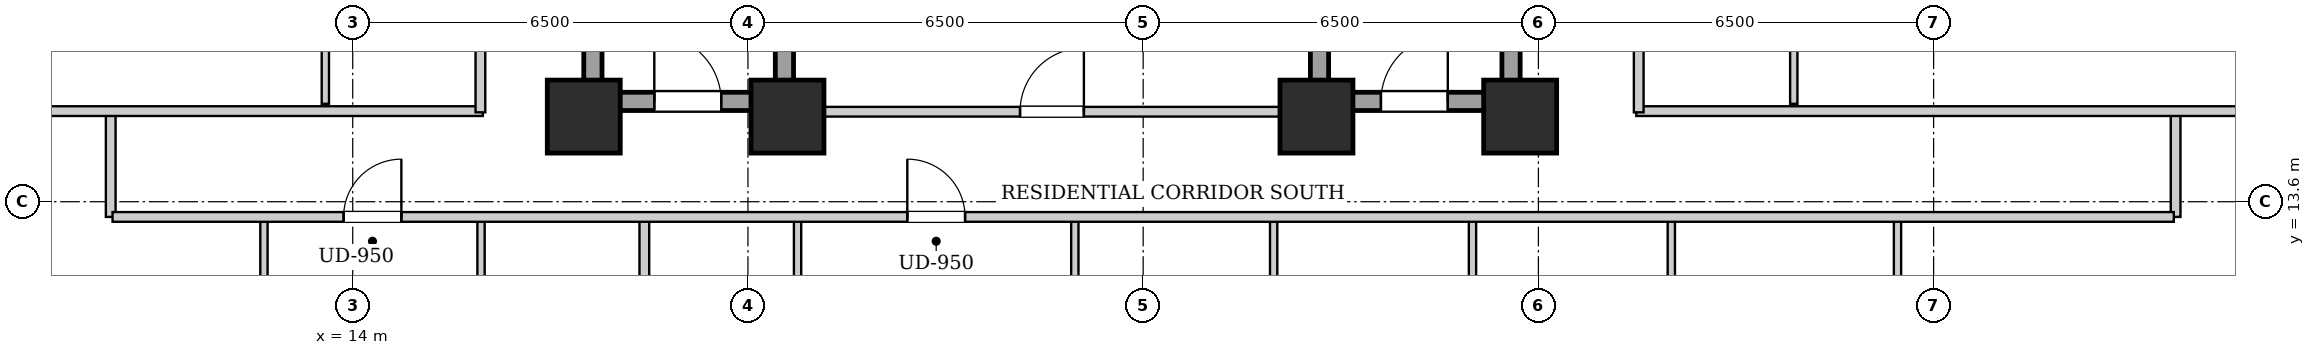
"""IFC4 building model, lengths in metres.
Left out: names, types, materials, properties, quantities, classifications, styles, units other than length and angle.
Written with IfcOpenShell. Run it as: python <this file> out.ifc"""

import sys

from ifc_helpers import new_model, si_unit, direction, frame, frame_2d, origin, origin_2d, place, context, subcontext, project, spatial, rectangle, extrude, element, fill, save


model = new_model("IFC4")
c1 = context("Model", 3, precision=1e-05, world=origin(), true_north=direction((0.0, 1.0)))
c2 = subcontext(c1, "Body", "Model", "MODEL_VIEW")
j1 = project(units=[si_unit("LENGTHUNIT", "METRE"), si_unit("PLANEANGLEUNIT", "RADIAN")], contexts=[c1])
p1 = place(None, origin())
s1 = spatial("IfcSite", under=j1, at=p1, CompositionType="ELEMENT")
p2 = place(p1, origin())
s2 = spatial("IfcBuilding", under=s1, at=p2, CompositionType="ELEMENT")
p3 = place(p2, frame((0.0, 0.0, 61.0)))
s3 = spatial("IfcBuildingStorey", under=s2, at=p3, CompositionType="ELEMENT", Elevation=61.0)
for number, where, z_axis, x_axis in (
    (1, (17.8, 15.0, 0.0), (0.0, 0.0, 1.0), (1.0, 0.0, 0.0)),
    (2, (21.15, 15.0, 0.0), (0.0, 0.0, 1.0), (1.0, 0.0, 0.0)),
    (3, (29.85, 15.0, 0.0), (0.0, 0.0, 1.0), (1.0, 0.0, 0.0)),
    (4, (33.2, 15.0, 0.0), (0.0, 0.0, 1.0), (1.0, 0.0, 0.0)),
):
    element("IfcColumn", number, at=place(p3, frame(where, z_axis=z_axis, x_axis=x_axis)), inside=s3, PredefinedType="COLUMN", context=c2, shape_type="SweptSolid", body=[
        extrude(rectangle(XDim=1.2, YDim=1.2, at=origin_2d()), origin(), (0.0, 0.0, 1.0), 3.2),
    ])
for number, where, z_axis, x_axis in (
    (5, (17.95, 15.1, 0.0), (0.0, 0.0, 1.0), (0.0, 1.0, 0.0)),
    (6, (21.1, 15.1, 0.0), (0.0, 0.0, 1.0), (0.0, 1.0, 0.0)),
):
    element("IfcWall", number, at=place(p3, frame(where, z_axis=z_axis, x_axis=x_axis)), inside=s3, PredefinedType="SHEAR", context=c2, shape_type="SweptSolid", body=[
        extrude(rectangle(XDim=9.0, YDim=0.3, at=frame_2d((4.5, 0.0))), origin(), (0.0, 0.0, 1.0), 2.94),
    ])
p4 = place(p3, frame((18.1, 15.25, 0.0), z_axis=(0.0, 0.0, 1.0), x_axis=(1.0, 0.0, 0.0)))
e7 = element("IfcWall", 7, at=p4, inside=s3, PredefinedType="SHEAR", context=c2, shape_type="SweptSolid", body=[
    extrude(rectangle(XDim=2.85, YDim=0.3, at=frame_2d((1.425, 0.0))), origin(), (0.0, 0.0, 1.0), 2.94),
])
p5 = place(p4, frame((0.86, 0.0, 0.0)))
e8 = element("IfcOpeningElement", 8, at=p5, cuts=e7, PredefinedType="OPENING", context=c2, shape_type="SweptSolid", body=[
    extrude(rectangle(XDim=1.1, YDim=2.05, at=frame_2d((0.55, 1.025))), frame((0.0, 0.16, 0.0), z_axis=(0.0, -1.0, 0.0), x_axis=(1.0, 0.0, 0.0)), (0.0, 0.0, 1.0), 0.32),
])
for number, where, z_axis, x_axis in (
    (9, (29.9, 15.1, 0.0), (0.0, 0.0, 1.0), (0.0, 1.0, 0.0)),
    (10, (33.05, 15.1, 0.0), (0.0, 0.0, 1.0), (0.0, 1.0, 0.0)),
):
    element("IfcWall", number, at=place(p3, frame(where, z_axis=z_axis, x_axis=x_axis)), inside=s3, PredefinedType="SHEAR", context=c2, shape_type="SweptSolid", body=[
        extrude(rectangle(XDim=9.0, YDim=0.3, at=frame_2d((4.5, 0.0))), origin(), (0.0, 0.0, 1.0), 2.94),
    ])
p6 = place(p3, frame((30.05, 15.25, 0.0), z_axis=(0.0, 0.0, 1.0), x_axis=(1.0, 0.0, 0.0)))
e11 = element("IfcWall", 11, at=p6, inside=s3, PredefinedType="SHEAR", context=c2, shape_type="SweptSolid", body=[
    extrude(rectangle(XDim=2.85, YDim=0.3, at=frame_2d((1.425, 0.0))), origin(), (0.0, 0.0, 1.0), 2.94),
])
p7 = place(p6, frame((0.86, 0.0, 0.0)))
e12 = element("IfcOpeningElement", 12, at=p7, cuts=e11, PredefinedType="OPENING", context=c2, shape_type="SweptSolid", body=[
    extrude(rectangle(XDim=1.1, YDim=2.05, at=frame_2d((0.55, 1.025))), frame((0.0, 0.16, 0.0), z_axis=(0.0, -1.0, 0.0), x_axis=(1.0, 0.0, 0.0)), (0.0, 0.0, 1.0), 0.32),
])
p8 = place(p3, frame((21.25, 15.08, 0.0), z_axis=(0.0, 0.0, 1.0), x_axis=(1.0, 0.0, 0.0)))
e13 = element("IfcWall", 13, at=p8, inside=s3, PredefinedType="PARTITIONING", context=c2, shape_type="SweptSolid", body=[
    extrude(rectangle(XDim=8.5, YDim=0.16, at=frame_2d((4.25, 0.0))), origin(), (0.0, 0.0, 1.0), 2.232),
])
p9 = place(p8, frame((3.725, 0.0, 0.0)))
e14 = element("IfcOpeningElement", 14, at=p9, cuts=e13, PredefinedType="OPENING", context=c2, shape_type="SweptSolid", body=[
    extrude(rectangle(XDim=1.05, YDim=2.05, at=frame_2d((0.525, 1.025))), frame((0.0, 0.09, 0.0), z_axis=(0.0, -1.0, 0.0), x_axis=(1.0, 0.0, 0.0)), (0.0, 0.0, 1.0), 0.18),
])
for number, where, z_axis, x_axis in (
    (15, (10.02, 13.35, 0.0), (0.0, 0.0, 1.0), (0.0, 1.0, 0.0)),
    (16, (43.98, 13.35, 0.0), (0.0, 0.0, 1.0), (0.0, 1.0, 0.0)),
):
    element("IfcWall", number, at=place(p3, frame(where, z_axis=z_axis, x_axis=x_axis)), inside=s3, PredefinedType="PARTITIONING", context=c2, shape_type="SweptSolid", body=[
        extrude(rectangle(XDim=1.74, YDim=0.16, at=frame_2d((0.87, 0.0))), origin(), (0.0, 0.0, 1.0), 2.94),
    ])
p10 = place(p3, frame((7.78, 15.09, 0.0), z_axis=(0.0, 0.0, 1.0), x_axis=(1.0, 0.0, 0.0)))
e17 = element("IfcWall", 17, at=p10, inside=s3, PredefinedType="PARTITIONING", context=c2, shape_type="SweptSolid", body=[
    extrude(rectangle(XDim=8.36, YDim=0.16, at=frame_2d((4.18, 0.0))), origin(), (0.0, 0.0, 1.0), 2.232),
])
p11 = place(p3, frame((35.11, 15.09, 0.0), z_axis=(0.0, 0.0, 1.0), x_axis=(1.0, 0.0, 0.0)))
e18 = element("IfcWall", 18, at=p11, inside=s3, PredefinedType="PARTITIONING", context=c2, shape_type="SweptSolid", body=[
    extrude(rectangle(XDim=11.11, YDim=0.16, at=frame_2d((5.555, 0.0))), origin(), (0.0, 0.0, 1.0), 2.232),
])
p12 = place(p3, frame((12.54, 10.46, 0.0), z_axis=(0.0, 0.0, 1.0), x_axis=(0.0, 1.0, 0.0)))
e19 = element("IfcWall", 19, at=p12, inside=s3, PredefinedType="PARTITIONING", context=c2, shape_type="SweptSolid", body=[
    extrude(rectangle(XDim=2.85, YDim=0.12, at=frame_2d((1.425, 0.0))), origin(), (0.0, 0.0, 1.0), 2.94),
])
p13 = place(p12, frame((0.995, 0.0, 0.0)))
e20 = element("IfcOpeningElement", 20, at=p13, cuts=e19, PredefinedType="OPENING", context=c2, shape_type="SweptSolid", body=[
    extrude(rectangle(XDim=0.86, YDim=2.05, at=frame_2d((0.43, 1.025))), frame((0.0, 0.07, 0.0), z_axis=(0.0, -1.0, 0.0), x_axis=(1.0, 0.0, 0.0)), (0.0, 0.0, 1.0), 0.14),
])
p14 = place(p3, frame((16.11, 10.46, 0.0), z_axis=(0.0, 0.0, 1.0), x_axis=(0.0, 1.0, 0.0)))
e21 = element("IfcWall", 21, at=p14, inside=s3, PredefinedType="PARTITIONING", context=c2, shape_type="SweptSolid", body=[
    extrude(rectangle(XDim=2.85, YDim=0.12, at=frame_2d((1.425, 0.0))), origin(), (0.0, 0.0, 1.0), 2.94),
])
p15 = place(p14, frame((0.975, 0.0, 0.0)))
e22 = element("IfcOpeningElement", 22, at=p15, cuts=e21, PredefinedType="OPENING", context=c2, shape_type="SweptSolid", body=[
    extrude(rectangle(XDim=0.9, YDim=2.05, at=frame_2d((0.45, 1.025))), frame((0.0, 0.07, 0.0), z_axis=(0.0, -1.0, 0.0), x_axis=(1.0, 0.0, 0.0)), (0.0, 0.0, 1.0), 0.14),
])
p16 = place(p3, frame((18.796, 0.28, 0.0), z_axis=(0.0, 0.0, 1.0), x_axis=(0.0, 1.0, 0.0)))
e23 = element("IfcWall", 23, at=p16, inside=s3, PredefinedType="PARTITIONING", context=c2, shape_type="SweptSolid", body=[
    extrude(rectangle(XDim=13.03, YDim=0.16, at=frame_2d((6.515, 0.0))), origin(), (0.0, 0.0, 1.0), 2.94),
])
p17 = place(p3, frame((21.316, 10.46, 0.0), z_axis=(0.0, 0.0, 1.0), x_axis=(0.0, 1.0, 0.0)))
e24 = element("IfcWall", 24, at=p17, inside=s3, PredefinedType="PARTITIONING", context=c2, shape_type="SweptSolid", body=[
    extrude(rectangle(XDim=2.85, YDim=0.12, at=frame_2d((1.425, 0.0))), origin(), (0.0, 0.0, 1.0), 2.94),
])
p18 = place(p17, frame((0.995, 0.0, 0.0)))
e25 = element("IfcOpeningElement", 25, at=p18, cuts=e24, PredefinedType="OPENING", context=c2, shape_type="SweptSolid", body=[
    extrude(rectangle(XDim=0.86, YDim=2.05, at=frame_2d((0.43, 1.025))), frame((0.0, 0.07, 0.0), z_axis=(0.0, -1.0, 0.0), x_axis=(1.0, 0.0, 0.0)), (0.0, 0.0, 1.0), 0.14),
])
p19 = place(p3, frame((25.876, 10.46, 0.0), z_axis=(0.0, 0.0, 1.0), x_axis=(0.0, 1.0, 0.0)))
e26 = element("IfcWall", 26, at=p19, inside=s3, PredefinedType="PARTITIONING", context=c2, shape_type="SweptSolid", body=[
    extrude(rectangle(XDim=2.85, YDim=0.12, at=frame_2d((1.425, 0.0))), origin(), (0.0, 0.0, 1.0), 2.94),
])
p20 = place(p19, frame((0.975, 0.0, 0.0)))
e27 = element("IfcOpeningElement", 27, at=p20, cuts=e26, PredefinedType="OPENING", context=c2, shape_type="SweptSolid", body=[
    extrude(rectangle(XDim=0.9, YDim=2.05, at=frame_2d((0.45, 1.025))), frame((0.0, 0.07, 0.0), z_axis=(0.0, -1.0, 0.0), x_axis=(1.0, 0.0, 0.0)), (0.0, 0.0, 1.0), 0.14),
])
p21 = place(p3, frame((29.146, 10.46, 0.0), z_axis=(0.0, 0.0, 1.0), x_axis=(0.0, 1.0, 0.0)))
e28 = element("IfcWall", 28, at=p21, inside=s3, PredefinedType="PARTITIONING", context=c2, shape_type="SweptSolid", body=[
    extrude(rectangle(XDim=2.85, YDim=0.12, at=frame_2d((1.425, 0.0))), origin(), (0.0, 0.0, 1.0), 2.94),
])
p22 = place(p21, frame((0.975, 0.0, 0.0)))
e29 = element("IfcOpeningElement", 29, at=p22, cuts=e28, PredefinedType="OPENING", context=c2, shape_type="SweptSolid", body=[
    extrude(rectangle(XDim=0.9, YDim=2.05, at=frame_2d((0.45, 1.025))), frame((0.0, 0.07, 0.0), z_axis=(0.0, -1.0, 0.0), x_axis=(1.0, 0.0, 0.0)), (0.0, 0.0, 1.0), 0.14),
])
p23 = place(p3, frame((32.416, 10.46, 0.0), z_axis=(0.0, 0.0, 1.0), x_axis=(0.0, 1.0, 0.0)))
e30 = element("IfcWall", 30, at=p23, inside=s3, PredefinedType="PARTITIONING", context=c2, shape_type="SweptSolid", body=[
    extrude(rectangle(XDim=2.85, YDim=0.12, at=frame_2d((1.425, 0.0))), origin(), (0.0, 0.0, 1.0), 2.94),
])
p24 = place(p23, frame((0.975, 0.0, 0.0)))
e31 = element("IfcOpeningElement", 31, at=p24, cuts=e30, PredefinedType="OPENING", context=c2, shape_type="SweptSolid", body=[
    extrude(rectangle(XDim=0.9, YDim=2.05, at=frame_2d((0.45, 1.025))), frame((0.0, 0.07, 0.0), z_axis=(0.0, -1.0, 0.0), x_axis=(1.0, 0.0, 0.0)), (0.0, 0.0, 1.0), 0.14),
])
p25 = place(p3, frame((35.686, 10.46, 0.0), z_axis=(0.0, 0.0, 1.0), x_axis=(0.0, 1.0, 0.0)))
e32 = element("IfcWall", 32, at=p25, inside=s3, PredefinedType="PARTITIONING", context=c2, shape_type="SweptSolid", body=[
    extrude(rectangle(XDim=2.85, YDim=0.12, at=frame_2d((1.425, 0.0))), origin(), (0.0, 0.0, 1.0), 2.94),
])
p26 = place(p25, frame((0.975, 0.0, 0.0)))
e33 = element("IfcOpeningElement", 33, at=p26, cuts=e32, PredefinedType="OPENING", context=c2, shape_type="SweptSolid", body=[
    extrude(rectangle(XDim=0.9, YDim=2.05, at=frame_2d((0.45, 1.025))), frame((0.0, 0.07, 0.0), z_axis=(0.0, -1.0, 0.0), x_axis=(1.0, 0.0, 0.0)), (0.0, 0.0, 1.0), 0.14),
])
p27 = place(p3, frame((39.406, 10.46, 0.0), z_axis=(0.0, 0.0, 1.0), x_axis=(0.0, 1.0, 0.0)))
e34 = element("IfcWall", 34, at=p27, inside=s3, PredefinedType="PARTITIONING", context=c2, shape_type="SweptSolid", body=[
    extrude(rectangle(XDim=2.85, YDim=0.12, at=frame_2d((1.425, 0.0))), origin(), (0.0, 0.0, 1.0), 2.94),
])
p28 = place(p27, frame((0.975, 0.0, 0.0)))
e35 = element("IfcOpeningElement", 35, at=p28, cuts=e34, PredefinedType="OPENING", context=c2, shape_type="SweptSolid", body=[
    extrude(rectangle(XDim=0.9, YDim=2.05, at=frame_2d((0.45, 1.025))), frame((0.0, 0.07, 0.0), z_axis=(0.0, -1.0, 0.0), x_axis=(1.0, 0.0, 0.0)), (0.0, 0.0, 1.0), 0.14),
])
p29 = place(p3, frame((13.55, 15.21, 0.0), z_axis=(0.0, 0.0, 1.0), x_axis=(0.0, 1.0, 0.0)))
e36 = element("IfcWall", 36, at=p29, inside=s3, PredefinedType="PARTITIONING", context=c2, shape_type="SweptSolid", body=[
    extrude(rectangle(XDim=2.159, YDim=0.12, at=frame_2d((1.08, 0.0))), origin(), (0.0, 0.0, 1.0), 2.94),
])
p30 = place(p3, frame((37.7, 15.21, 0.0), z_axis=(0.0, 0.0, 1.0), x_axis=(0.0, 1.0, 0.0)))
e37 = element("IfcWall", 37, at=p30, inside=s3, PredefinedType="PARTITIONING", context=c2, shape_type="SweptSolid", body=[
    extrude(rectangle(XDim=2.3, YDim=0.12, at=frame_2d((1.15, 0.0))), origin(), (0.0, 0.0, 1.0), 2.94),
])
p31 = place(p3, frame((10.05, 13.35, 0.0), z_axis=(0.0, 0.0, 1.0), x_axis=(1.0, 0.0, 0.0)))
e38 = element("IfcWall", 38, at=p31, inside=s3, PredefinedType="PARTITIONING", context=c2, shape_type="SweptSolid", body=[
    extrude(rectangle(XDim=33.9, YDim=0.16, at=frame_2d((16.95, 0.0))), origin(), (0.0, 0.0, 1.0), 2.94),
])
p32 = place(p31, frame((3.8, 0.0, 0.0)))
e39 = element("IfcOpeningElement", 39, at=p32, cuts=e38, PredefinedType="OPENING", context=c2, shape_type="SweptSolid", body=[
    extrude(rectangle(XDim=0.95, YDim=2.1, at=frame_2d((0.475, 1.05))), frame((0.0, 0.09, 0.0), z_axis=(0.0, -1.0, 0.0), x_axis=(1.0, 0.0, 0.0)), (0.0, 0.0, 1.0), 0.18),
])
p33 = place(p31, frame((13.071, 0.0, 0.0)))
e40 = element("IfcOpeningElement", 40, at=p33, cuts=e38, PredefinedType="OPENING", context=c2, shape_type="SweptSolid", body=[
    extrude(rectangle(XDim=0.95, YDim=2.1, at=frame_2d((0.475, 1.05))), frame((0.0, 0.09, 0.0), z_axis=(0.0, -1.0, 0.0), x_axis=(1.0, 0.0, 0.0)), (0.0, 0.0, 1.0), 0.18),
])
p34 = place(p3, frame((16.1, 15.07, 0.0), z_axis=(0.0, 0.0, 1.0), x_axis=(0.0, 1.0, 0.0)))
e41 = element("IfcWall", 41, at=p34, inside=s3, PredefinedType="PARTITIONING", context=c2, shape_type="SweptSolid", body=[
    extrude(rectangle(XDim=13.93, YDim=0.16, at=frame_2d((6.965, 0.0))), origin(), (0.0, 0.0, 1.0), 2.94),
])
p35 = place(p34, frame((4.661, 0.0, 0.0)))
e42 = element("IfcOpeningElement", 42, at=p35, cuts=e41, PredefinedType="OPENING", context=c2, shape_type="SweptSolid", body=[
    extrude(rectangle(XDim=0.95, YDim=2.1, at=frame_2d((0.475, 1.05))), frame((0.0, 0.09, 0.0), z_axis=(0.0, -1.0, 0.0), x_axis=(1.0, 0.0, 0.0)), (0.0, 0.0, 1.0), 0.18),
])
p36 = place(p34, frame((11.411, 0.0, 0.0)))
e43 = element("IfcOpeningElement", 43, at=p36, cuts=e41, PredefinedType="OPENING", context=c2, shape_type="SweptSolid", body=[
    extrude(rectangle(XDim=0.95, YDim=2.1, at=frame_2d((0.475, 1.05))), frame((0.0, 0.09, 0.0), z_axis=(0.0, -1.0, 0.0), x_axis=(1.0, 0.0, 0.0)), (0.0, 0.0, 1.0), 0.18),
])
p37 = place(p3, frame((35.15, 15.07, 0.0), z_axis=(0.0, 0.0, 1.0), x_axis=(0.0, 1.0, 0.0)))
e44 = element("IfcWall", 44, at=p37, inside=s3, PredefinedType="PARTITIONING", context=c2, shape_type="SweptSolid", body=[
    extrude(rectangle(XDim=13.93, YDim=0.16, at=frame_2d((6.965, 0.0))), origin(), (0.0, 0.0, 1.0), 2.94),
])
p38 = place(p37, frame((4.385, 0.0, 0.0)))
e45 = element("IfcOpeningElement", 45, at=p38, cuts=e44, PredefinedType="OPENING", context=c2, shape_type="SweptSolid", body=[
    extrude(rectangle(XDim=0.95, YDim=2.1, at=frame_2d((0.475, 1.05))), frame((0.0, 0.09, 0.0), z_axis=(0.0, -1.0, 0.0), x_axis=(1.0, 0.0, 0.0)), (0.0, 0.0, 1.0), 0.18),
])
p39 = place(p5, origin())
e46 = element("IfcDoor", 46, at=p39, inside=s3, OperationType="SINGLE_SWING_LEFT", PredefinedType="DOOR", context=c2, shape_type="SweptSolid", body=[
    extrude(rectangle(XDim=1.1, YDim=2.05, at=frame_2d((0.55, 1.025))), frame((0.0, 0.025, 0.0), z_axis=(0.0, -1.0, 0.0), x_axis=(1.0, 0.0, 0.0)), (0.0, 0.0, 1.0), 0.05),
])
fill(e8, e46)
p40 = place(p7, origin())
e47 = element("IfcDoor", 47, at=p40, inside=s3, OperationType="SINGLE_SWING_RIGHT", PredefinedType="DOOR", context=c2, shape_type="SweptSolid", body=[
    extrude(rectangle(XDim=1.1, YDim=2.05, at=frame_2d((0.55, 1.025))), frame((0.0, 0.025, 0.0), z_axis=(0.0, -1.0, 0.0), x_axis=(1.0, 0.0, 0.0)), (0.0, 0.0, 1.0), 0.05),
])
fill(e12, e47)
p41 = place(p9, origin())
e48 = element("IfcDoor", 48, at=p41, inside=s3, OperationType="SINGLE_SWING_RIGHT", PredefinedType="DOOR", context=c2, shape_type="SweptSolid", body=[
    extrude(rectangle(XDim=1.05, YDim=2.05, at=frame_2d((0.525, 1.025))), frame((0.0, 0.025, 0.0), z_axis=(0.0, -1.0, 0.0), x_axis=(1.0, 0.0, 0.0)), (0.0, 0.0, 1.0), 0.05),
])
fill(e14, e48)
p42 = place(p32, origin())
e49 = element("IfcDoor", 49, at=p42, inside=s3, OperationType="SINGLE_SWING_RIGHT", PredefinedType="DOOR", context=c2, shape_type="SweptSolid", body=[
    extrude(rectangle(XDim=0.95, YDim=2.1, at=frame_2d((0.475, 1.05))), frame((0.0, 0.025, 0.0), z_axis=(0.0, -1.0, 0.0), x_axis=(1.0, 0.0, 0.0)), (0.0, 0.0, 1.0), 0.05),
])
fill(e39, e49)
p43 = place(p33, origin())
e50 = element("IfcDoor", 50, at=p43, inside=s3, OperationType="SINGLE_SWING_LEFT", PredefinedType="DOOR", context=c2, shape_type="SweptSolid", body=[
    extrude(rectangle(XDim=0.95, YDim=2.1, at=frame_2d((0.475, 1.05))), frame((0.0, 0.025, 0.0), z_axis=(0.0, -1.0, 0.0), x_axis=(1.0, 0.0, 0.0)), (0.0, 0.0, 1.0), 0.05),
])
fill(e40, e50)
save(model, sys.argv[1])
